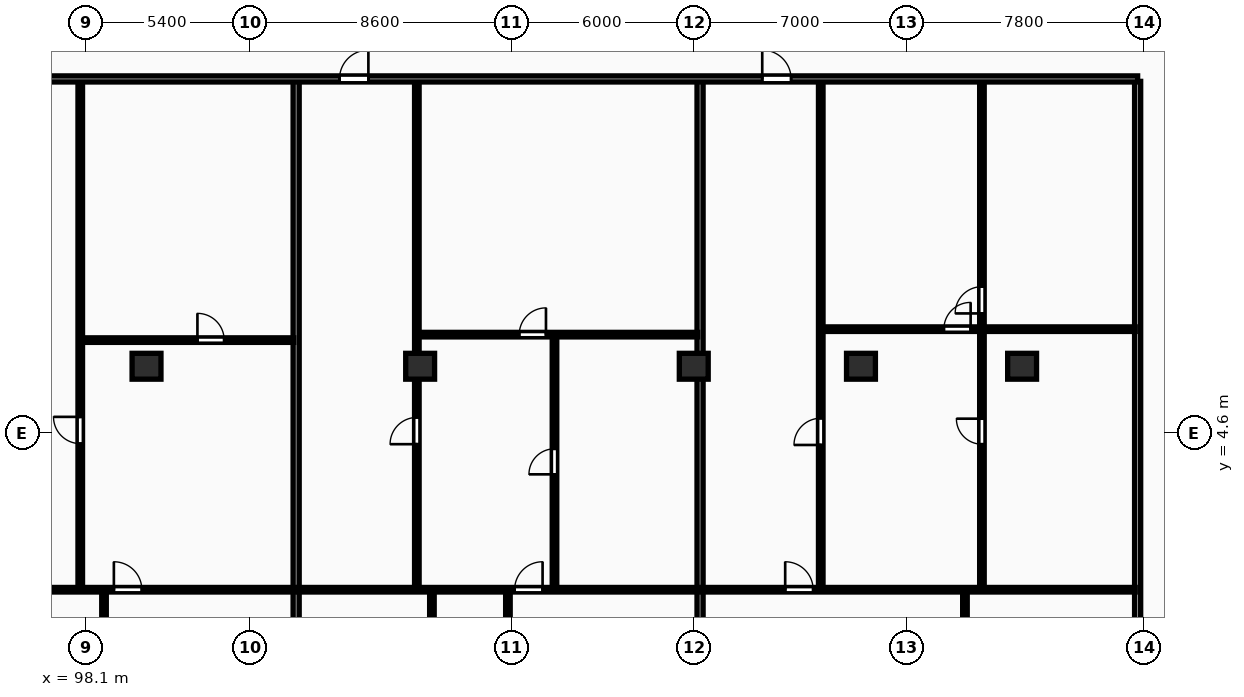
"""IFC4 building model, lengths in metres.
Left out: names, types, materials, properties, quantities, classifications, styles, units other than length and angle.
Written with IfcOpenShell. Run it as: python <this file> out.ifc"""

import sys

from ifc_helpers import new_model, si_unit, direction, frame, frame_2d, origin, origin_2d, place, context, subcontext, project, spatial, rectangle, extrude, element, fill, save


model = new_model("IFC4")
c1 = context("Model", 3, precision=1e-05, world=origin(), true_north=direction((0.0, 1.0)))
c2 = subcontext(c1, "Body", "Model", "MODEL_VIEW")
j1 = project(units=[si_unit("LENGTHUNIT", "METRE"), si_unit("PLANEANGLEUNIT", "RADIAN")], contexts=[c1])
p1 = place(None, origin())
s1 = spatial("IfcSite", under=j1, at=p1, CompositionType="ELEMENT")
p2 = place(p1, origin())
s2 = spatial("IfcBuilding", under=s1, at=p2, CompositionType="ELEMENT")
p3 = place(p2, frame((0.0, 0.0, 24.0)))
s3 = spatial("IfcBuildingStorey", under=s2, at=p3, CompositionType="ELEMENT", Elevation=24.0)
for number, where, z_axis, x_axis in (
    (1, (100.1, 6.8, 0.0), (0.0, 0.0, 1.0), (1.0, 0.0, 0.0)),
    (2, (109.1, 6.8, 0.0), (0.0, 0.0, 1.0), (1.0, 0.0, 0.0)),
    (3, (118.1, 6.8, 0.0), (0.0, 0.0, 1.0), (1.0, 0.0, 0.0)),
    (4, (123.6, 6.8, 0.0), (0.0, 0.0, 1.0), (1.0, 0.0, 0.0)),
    (5, (128.9, 6.8, 0.0), (0.0, 0.0, 1.0), (1.0, 0.0, 0.0)),
):
    element("IfcColumn", number, at=place(p3, frame(where, z_axis=z_axis, x_axis=x_axis)), inside=s3, PredefinedType="COLUMN", context=c2, shape_type="SweptSolid", body=[
        extrude(rectangle(XDim=0.95, YDim=0.85, at=origin_2d()), origin(), (0.0, 0.0, 1.0), 3.25),
    ])
for number, where, z_axis, x_axis in (
    (6, (132.7, -10.9, 0.0), (0.0, 0.0, 1.0), (0.0, 1.0, 0.0)),
    (7, (105.021, -10.9, 0.0), (0.0, 0.0, 1.0), (0.0, 1.0, 0.0)),
):
    element("IfcWall", number, at=place(p3, frame(where, z_axis=z_axis, x_axis=x_axis)), inside=s3, PredefinedType="PARTITIONING", context=c2, shape_type="SweptSolid", body=[
        extrude(rectangle(XDim=27.07, YDim=0.2, at=frame_2d((13.535, 0.0))), origin(), (0.0, 0.0, 1.0), 2.97),
    ])
p4 = place(p3, frame((97.98, 7.66, 0.0), z_axis=(0.0, 0.0, 1.0), x_axis=(1.0, 0.0, 0.0)))
e8 = element("IfcWall", 8, at=p4, inside=s3, PredefinedType="PARTITIONING", context=c2, shape_type="SweptSolid", body=[
    extrude(rectangle(XDim=6.961, YDim=0.15, at=frame_2d((3.481, 0.0))), origin(), (0.0, 0.0, 1.0), 2.97),
])
p5 = place(p4, frame((3.794, 0.0, 0.0)))
e9 = element("IfcOpeningElement", 9, at=p5, cuts=e8, PredefinedType="OPENING", context=c2, shape_type="SweptSolid", body=[
    extrude(rectangle(XDim=0.88, YDim=2.06, at=frame_2d((0.44, 1.03))), frame((0.0, 0.085, 0.0), z_axis=(0.0, -1.0, 0.0), x_axis=(1.0, 0.0, 0.0)), (0.0, 0.0, 1.0), 0.17),
])
p6 = place(p3, frame((97.92, -0.51, 0.0), z_axis=(0.0, 0.0, 1.0), x_axis=(0.0, 1.0, 0.0)))
e10 = element("IfcWall", 10, at=p6, inside=s3, PredefinedType="PARTITIONING", context=c2, shape_type="SweptSolid", body=[
    extrude(rectangle(XDim=16.7, YDim=0.15, at=frame_2d((8.35, 0.0))), origin(), (0.0, 0.0, 1.0), 2.97),
])
p7 = place(p6, frame((4.765, 0.0, 0.0)))
e11 = element("IfcOpeningElement", 11, at=p7, cuts=e10, PredefinedType="OPENING", context=c2, shape_type="SweptSolid", body=[
    extrude(rectangle(XDim=0.88, YDim=2.06, at=frame_2d((0.44, 1.03))), frame((0.0, 0.085, 0.0), z_axis=(0.0, -1.0, 0.0), x_axis=(1.0, 0.0, 0.0)), (0.0, 0.0, 1.0), 0.17),
])
p8 = place(p3, frame((98.701, -5.59, 0.0), z_axis=(0.0, 0.0, 1.0), x_axis=(0.0, 1.0, 0.0)))
e12 = element("IfcWall", 12, at=p8, inside=s3, PredefinedType="PARTITIONING", context=c2, shape_type="SweptSolid", body=[
    extrude(rectangle(XDim=5.0, YDim=0.15, at=frame_2d((2.5, 0.0))), origin(), (0.0, 0.0, 1.0), 2.97),
])
p9 = place(p8, frame((3.088, 0.0, 0.0)))
e13 = element("IfcOpeningElement", 13, at=p9, cuts=e12, PredefinedType="OPENING", context=c2, shape_type="SweptSolid", body=[
    extrude(rectangle(XDim=0.84, YDim=2.04, at=frame_2d((0.42, 1.02))), frame((0.0, 0.085, 0.0), z_axis=(0.0, -1.0, 0.0), x_axis=(1.0, 0.0, 0.0)), (0.0, 0.0, 1.0), 0.17),
])
p10 = place(p3, frame((94.03, -0.55, 0.0), z_axis=(0.0, 0.0, 1.0), x_axis=(1.0, 0.0, 0.0)))
e14 = element("IfcWall", 14, at=p10, inside=s3, PredefinedType="PARTITIONING", context=c2, shape_type="SweptSolid", body=[
    extrude(rectangle(XDim=10.911, YDim=0.15, at=frame_2d((5.456, 0.0))), origin(), (0.0, 0.0, 1.0), 2.97),
])
p11 = place(p10, frame((4.996, 0.0, 0.0)))
e15 = element("IfcOpeningElement", 15, at=p11, cuts=e14, PredefinedType="OPENING", context=c2, shape_type="SweptSolid", body=[
    extrude(rectangle(XDim=0.92, YDim=2.08, at=frame_2d((0.46, 1.04))), frame((0.0, 0.085, 0.0), z_axis=(0.0, -1.0, 0.0), x_axis=(1.0, 0.0, 0.0)), (0.0, 0.0, 1.0), 0.17),
])
p12 = place(p3, frame((118.307, -10.9, 0.0), z_axis=(0.0, 0.0, 1.0), x_axis=(0.0, 1.0, 0.0)))
e16 = element("IfcWall", 16, at=p12, inside=s3, PredefinedType="PARTITIONING", context=c2, shape_type="SweptSolid", body=[
    extrude(rectangle(XDim=27.07, YDim=0.2, at=frame_2d((13.535, 0.0))), origin(), (0.0, 0.0, 1.0), 2.22),
])
p13 = place(p3, frame((113.519, -0.51, 0.0), z_axis=(0.0, 0.0, 1.0), x_axis=(0.0, 1.0, 0.0)))
e17 = element("IfcWall", 17, at=p13, inside=s3, PredefinedType="PARTITIONING", context=c2, shape_type="SweptSolid", body=[
    extrude(rectangle(XDim=8.35, YDim=0.15, at=frame_2d((4.175, 0.0))), origin(), (0.0, 0.0, 1.0), 2.97),
])
p14 = place(p13, frame((3.755, 0.0, 0.0)))
e18 = element("IfcOpeningElement", 18, at=p14, cuts=e17, PredefinedType="OPENING", context=c2, shape_type="SweptSolid", body=[
    extrude(rectangle(XDim=0.84, YDim=2.04, at=frame_2d((0.42, 1.02))), frame((0.0, 0.085, 0.0), z_axis=(0.0, -1.0, 0.0), x_axis=(1.0, 0.0, 0.0)), (0.0, 0.0, 1.0), 0.17),
])
p15 = place(p3, frame((109.052, 7.84, 0.0), z_axis=(0.0, 0.0, 1.0), x_axis=(1.0, 0.0, 0.0)))
e19 = element("IfcWall", 19, at=p15, inside=s3, PredefinedType="PARTITIONING", context=c2, shape_type="SweptSolid", body=[
    extrude(rectangle(XDim=9.176, YDim=0.15, at=frame_2d((4.588, 0.0))), origin(), (0.0, 0.0, 1.0), 2.97),
])
p16 = place(p15, frame((3.307, 0.0, 0.0)))
e20 = element("IfcOpeningElement", 20, at=p16, cuts=e19, PredefinedType="OPENING", context=c2, shape_type="SweptSolid", body=[
    extrude(rectangle(XDim=0.88, YDim=2.06, at=frame_2d((0.44, 1.03))), frame((0.0, 0.085, 0.0), z_axis=(0.0, -1.0, 0.0), x_axis=(1.0, 0.0, 0.0)), (0.0, 0.0, 1.0), 0.17),
])
p17 = place(p3, frame((108.991, -0.51, 0.0), z_axis=(0.0, 0.0, 1.0), x_axis=(0.0, 1.0, 0.0)))
e21 = element("IfcWall", 21, at=p17, inside=s3, PredefinedType="PARTITIONING", context=c2, shape_type="SweptSolid", body=[
    extrude(rectangle(XDim=16.7, YDim=0.15, at=frame_2d((8.35, 0.0))), origin(), (0.0, 0.0, 1.0), 2.22),
])
p18 = place(p17, frame((4.747, 0.0, 0.0)))
e22 = element("IfcOpeningElement", 22, at=p18, cuts=e21, PredefinedType="OPENING", context=c2, shape_type="SweptSolid", body=[
    extrude(rectangle(XDim=0.88, YDim=2.06, at=frame_2d((0.44, 1.03))), frame((0.0, 0.085, 0.0), z_axis=(0.0, -1.0, 0.0), x_axis=(1.0, 0.0, 0.0)), (0.0, 0.0, 1.0), 0.17),
])
p19 = place(p3, frame((109.487, -5.59, 0.0), z_axis=(0.0, 0.0, 1.0), x_axis=(0.0, 1.0, 0.0)))
e23 = element("IfcWall", 23, at=p19, inside=s3, PredefinedType="PARTITIONING", context=c2, shape_type="SweptSolid", body=[
    extrude(rectangle(XDim=5.0, YDim=0.15, at=frame_2d((2.5, 0.0))), origin(), (0.0, 0.0, 1.0), 2.22),
])
p20 = place(p19, frame((3.049, 0.0, 0.0)))
e24 = element("IfcOpeningElement", 24, at=p20, cuts=e23, PredefinedType="OPENING", context=c2, shape_type="SweptSolid", body=[
    extrude(rectangle(XDim=0.84, YDim=2.04, at=frame_2d((0.42, 1.02))), frame((0.0, 0.085, 0.0), z_axis=(0.0, -1.0, 0.0), x_axis=(1.0, 0.0, 0.0)), (0.0, 0.0, 1.0), 0.17),
])
p21 = place(p3, frame((111.987, -5.59, 0.0), z_axis=(0.0, 0.0, 1.0), x_axis=(0.0, 1.0, 0.0)))
e25 = element("IfcWall", 25, at=p21, inside=s3, PredefinedType="PARTITIONING", context=c2, shape_type="SweptSolid", body=[
    extrude(rectangle(XDim=5.0, YDim=0.15, at=frame_2d((2.5, 0.0))), origin(), (0.0, 0.0, 1.0), 2.97),
])
p22 = place(p21, frame((2.08, 0.0, 0.0)))
e26 = element("IfcOpeningElement", 26, at=p22, cuts=e25, PredefinedType="OPENING", context=c2, shape_type="SweptSolid", body=[
    extrude(rectangle(XDim=0.84, YDim=2.04, at=frame_2d((0.42, 1.02))), frame((0.0, 0.085, 0.0), z_axis=(0.0, -1.0, 0.0), x_axis=(1.0, 0.0, 0.0)), (0.0, 0.0, 1.0), 0.17),
])
p23 = place(p3, frame((105.101, -0.55, 0.0), z_axis=(0.0, 0.0, 1.0), x_axis=(1.0, 0.0, 0.0)))
e27 = element("IfcWall", 27, at=p23, inside=s3, PredefinedType="PARTITIONING", context=c2, shape_type="SweptSolid", body=[
    extrude(rectangle(XDim=13.126, YDim=0.15, at=frame_2d((6.563, 0.0))), origin(), (0.0, 0.0, 1.0), 2.97),
])
p24 = place(p23, frame((7.106, 0.0, 0.0)))
e28 = element("IfcOpeningElement", 28, at=p24, cuts=e27, PredefinedType="OPENING", context=c2, shape_type="SweptSolid", body=[
    extrude(rectangle(XDim=0.92, YDim=2.08, at=frame_2d((0.46, 1.04))), frame((0.0, 0.085, 0.0), z_axis=(0.0, -1.0, 0.0), x_axis=(1.0, 0.0, 0.0)), (0.0, 0.0, 1.0), 0.17),
])
p25 = place(p3, frame((127.579, -0.51, 0.0), z_axis=(0.0, 0.0, 1.0), x_axis=(0.0, 1.0, 0.0)))
e29 = element("IfcWall", 29, at=p25, inside=s3, PredefinedType="PARTITIONING", context=c2, shape_type="SweptSolid", body=[
    extrude(rectangle(XDim=16.7, YDim=0.15, at=frame_2d((8.35, 0.0))), origin(), (0.0, 0.0, 1.0), 2.97),
])
p26 = place(p25, frame((4.746, 0.0, 0.0)))
e30 = element("IfcOpeningElement", 30, at=p26, cuts=e29, PredefinedType="OPENING", context=c2, shape_type="SweptSolid", body=[
    extrude(rectangle(XDim=0.84, YDim=2.04, at=frame_2d((0.42, 1.02))), frame((0.0, 0.085, 0.0), z_axis=(0.0, -1.0, 0.0), x_axis=(1.0, 0.0, 0.0)), (0.0, 0.0, 1.0), 0.17),
])
p27 = place(p25, frame((9.048, 0.0, 0.0)))
e31 = element("IfcOpeningElement", 31, at=p27, cuts=e29, PredefinedType="OPENING", context=c2, shape_type="SweptSolid", body=[
    extrude(rectangle(XDim=0.88, YDim=2.06, at=frame_2d((0.44, 1.03))), frame((0.0, 0.085, 0.0), z_axis=(0.0, -1.0, 0.0), x_axis=(1.0, 0.0, 0.0)), (0.0, 0.0, 1.0), 0.17),
])
p28 = place(p3, frame((122.337, 8.02, 0.0), z_axis=(0.0, 0.0, 1.0), x_axis=(1.0, 0.0, 0.0)))
e32 = element("IfcWall", 32, at=p28, inside=s3, PredefinedType="PARTITIONING", context=c2, shape_type="SweptSolid", body=[
    extrude(rectangle(XDim=10.283, YDim=0.15, at=frame_2d((5.142, 0.0))), origin(), (0.0, 0.0, 1.0), 2.97),
])
p29 = place(p28, frame((3.99, 0.0, 0.0)))
e33 = element("IfcOpeningElement", 33, at=p29, cuts=e32, PredefinedType="OPENING", context=c2, shape_type="SweptSolid", body=[
    extrude(rectangle(XDim=0.88, YDim=2.06, at=frame_2d((0.44, 1.03))), frame((0.0, 0.085, 0.0), z_axis=(0.0, -1.0, 0.0), x_axis=(1.0, 0.0, 0.0)), (0.0, 0.0, 1.0), 0.17),
])
p30 = place(p3, frame((122.277, -0.51, 0.0), z_axis=(0.0, 0.0, 1.0), x_axis=(0.0, 1.0, 0.0)))
e34 = element("IfcWall", 34, at=p30, inside=s3, PredefinedType="PARTITIONING", context=c2, shape_type="SweptSolid", body=[
    extrude(rectangle(XDim=16.7, YDim=0.15, at=frame_2d((8.35, 0.0))), origin(), (0.0, 0.0, 1.0), 2.97),
])
p31 = place(p30, frame((4.721, 0.0, 0.0)))
e35 = element("IfcOpeningElement", 35, at=p31, cuts=e34, PredefinedType="OPENING", context=c2, shape_type="SweptSolid", body=[
    extrude(rectangle(XDim=0.88, YDim=2.06, at=frame_2d((0.44, 1.03))), frame((0.0, 0.085, 0.0), z_axis=(0.0, -1.0, 0.0), x_axis=(1.0, 0.0, 0.0)), (0.0, 0.0, 1.0), 0.17),
])
p32 = place(p3, frame((127.02, -10.9, 0.0), z_axis=(0.0, 0.0, 1.0), x_axis=(0.0, 1.0, 0.0)))
e36 = element("IfcWall", 36, at=p32, inside=s3, PredefinedType="PARTITIONING", context=c2, shape_type="SweptSolid", body=[
    extrude(rectangle(XDim=10.31, YDim=0.15, at=frame_2d((5.155, 0.0))), origin(), (0.0, 0.0, 1.0), 2.97),
])
p33 = place(p32, frame((5.55, 0.0, 0.0)))
e37 = element("IfcOpeningElement", 37, at=p33, cuts=e36, PredefinedType="OPENING", context=c2, shape_type="SweptSolid", body=[
    extrude(rectangle(XDim=0.84, YDim=2.04, at=frame_2d((0.42, 1.02))), frame((0.0, 0.085, 0.0), z_axis=(0.0, -1.0, 0.0), x_axis=(1.0, 0.0, 0.0)), (0.0, 0.0, 1.0), 0.17),
])
p34 = place(p32, frame((8.362, 0.0, 0.0)))
e38 = element("IfcOpeningElement", 38, at=p34, cuts=e36, PredefinedType="OPENING", context=c2, shape_type="SweptSolid", body=[
    extrude(rectangle(XDim=0.84, YDim=2.04, at=frame_2d((0.42, 1.02))), frame((0.0, 0.085, 0.0), z_axis=(0.0, -1.0, 0.0), x_axis=(1.0, 0.0, 0.0)), (0.0, 0.0, 1.0), 0.17),
])
p35 = place(p32, frame((3.95, 0.0, 0.0)))
e39 = element("IfcOpeningElement", 39, at=p35, cuts=e36, PredefinedType="OPENING", context=c2, shape_type="SweptSolid", body=[
    extrude(rectangle(XDim=0.88, YDim=2.06, at=frame_2d((0.44, 1.03))), frame((0.0, 0.085, 0.0), z_axis=(0.0, -1.0, 0.0), x_axis=(1.0, 0.0, 0.0)), (0.0, 0.0, 1.0), 0.17),
])
p36 = place(p3, frame((118.387, -0.55, 0.0), z_axis=(0.0, 0.0, 1.0), x_axis=(1.0, 0.0, 0.0)))
e40 = element("IfcWall", 40, at=p36, inside=s3, PredefinedType="PARTITIONING", context=c2, shape_type="SweptSolid", body=[
    extrude(rectangle(XDim=14.233, YDim=0.15, at=frame_2d((7.116, 0.0))), origin(), (0.0, 0.0, 1.0), 2.97),
])
p37 = place(p36, frame((2.72, 0.0, 0.0)))
e41 = element("IfcOpeningElement", 41, at=p37, cuts=e40, PredefinedType="OPENING", context=c2, shape_type="SweptSolid", body=[
    extrude(rectangle(XDim=0.92, YDim=2.08, at=frame_2d((0.46, 1.04))), frame((0.0, 0.085, 0.0), z_axis=(0.0, -1.0, 0.0), x_axis=(1.0, 0.0, 0.0)), (0.0, 0.0, 1.0), 0.17),
])
p38 = place(p3, frame((70.7, 16.25, 0.0), z_axis=(0.0, 0.0, 1.0), x_axis=(1.0, 0.0, 0.0)))
e42 = element("IfcWall", 42, at=p38, inside=s3, PredefinedType="PARTITIONING", context=c2, shape_type="SweptSolid", body=[
    extrude(rectangle(XDim=62.0, YDim=0.2, at=frame_2d((31.0, 0.0))), origin(), (0.0, 0.0, 1.0), 2.97),
])
p39 = place(p38, frame((1.186, 0.0, 0.0)))
e43 = element("IfcOpeningElement", 43, at=p39, cuts=e42, PredefinedType="OPENING", context=c2, shape_type="SweptSolid", body=[
    extrude(rectangle(XDim=0.95, YDim=2.15, at=frame_2d((0.475, 1.075))), frame((0.0, 0.11, 0.0), z_axis=(0.0, -1.0, 0.0), x_axis=(1.0, 0.0, 0.0)), (0.0, 0.0, 1.0), 0.22),
])
p40 = place(p38, frame((13.116, 0.0, 0.0)))
e44 = element("IfcOpeningElement", 44, at=p40, cuts=e42, PredefinedType="OPENING", context=c2, shape_type="SweptSolid", body=[
    extrude(rectangle(XDim=0.95, YDim=2.15, at=frame_2d((0.475, 1.075))), frame((0.0, 0.11, 0.0), z_axis=(0.0, -1.0, 0.0), x_axis=(1.0, 0.0, 0.0)), (0.0, 0.0, 1.0), 0.22),
])
p41 = place(p38, frame((25.295, 0.0, 0.0)))
e45 = element("IfcOpeningElement", 45, at=p41, cuts=e42, PredefinedType="OPENING", context=c2, shape_type="SweptSolid", body=[
    extrude(rectangle(XDim=0.95, YDim=2.15, at=frame_2d((0.475, 1.075))), frame((0.0, 0.11, 0.0), z_axis=(0.0, -1.0, 0.0), x_axis=(1.0, 0.0, 0.0)), (0.0, 0.0, 1.0), 0.22),
])
p42 = place(p38, frame((35.747, 0.0, 0.0)))
e46 = element("IfcOpeningElement", 46, at=p42, cuts=e42, PredefinedType="OPENING", context=c2, shape_type="SweptSolid", body=[
    extrude(rectangle(XDim=0.95, YDim=2.15, at=frame_2d((0.475, 1.075))), frame((0.0, 0.11, 0.0), z_axis=(0.0, -1.0, 0.0), x_axis=(1.0, 0.0, 0.0)), (0.0, 0.0, 1.0), 0.22),
])
p43 = place(p38, frame((49.652, 0.0, 0.0)))
e47 = element("IfcOpeningElement", 47, at=p43, cuts=e42, PredefinedType="OPENING", context=c2, shape_type="SweptSolid", body=[
    extrude(rectangle(XDim=0.95, YDim=2.15, at=frame_2d((0.475, 1.075))), frame((0.0, 0.11, 0.0), z_axis=(0.0, -1.0, 0.0), x_axis=(1.0, 0.0, 0.0)), (0.0, 0.0, 1.0), 0.22),
])
p44 = place(p5, origin())
e48 = element("IfcDoor", 48, at=p44, inside=s3, OperationType="SINGLE_SWING_LEFT", PredefinedType="DOOR", context=c2, shape_type="SweptSolid", body=[
    extrude(rectangle(XDim=0.88, YDim=2.06, at=frame_2d((0.44, 1.03))), frame((0.0, 0.025, 0.0), z_axis=(0.0, -1.0, 0.0), x_axis=(1.0, 0.0, 0.0)), (0.0, 0.0, 1.0), 0.05),
])
fill(e9, e48)
p45 = place(p7, origin())
e49 = element("IfcDoor", 49, at=p45, inside=s3, OperationType="SINGLE_SWING_RIGHT", PredefinedType="DOOR", context=c2, shape_type="SweptSolid", body=[
    extrude(rectangle(XDim=0.88, YDim=2.06, at=frame_2d((0.44, 1.03))), frame((0.0, 0.025, 0.0), z_axis=(0.0, -1.0, 0.0), x_axis=(1.0, 0.0, 0.0)), (0.0, 0.0, 1.0), 0.05),
])
fill(e11, e49)
p46 = place(p11, origin())
e50 = element("IfcDoor", 50, at=p46, inside=s3, OperationType="SINGLE_SWING_LEFT", PredefinedType="DOOR", context=c2, shape_type="SweptSolid", body=[
    extrude(rectangle(XDim=0.92, YDim=2.08, at=frame_2d((0.46, 1.04))), frame((0.0, 0.025, 0.0), z_axis=(0.0, -1.0, 0.0), x_axis=(1.0, 0.0, 0.0)), (0.0, 0.0, 1.0), 0.05),
])
fill(e15, e50)
p47 = place(p14, origin())
e51 = element("IfcDoor", 51, at=p47, inside=s3, OperationType="SINGLE_SWING_LEFT", PredefinedType="DOOR", context=c2, shape_type="SweptSolid", body=[
    extrude(rectangle(XDim=0.84, YDim=2.04, at=frame_2d((0.42, 1.02))), frame((0.0, 0.025, 0.0), z_axis=(0.0, -1.0, 0.0), x_axis=(1.0, 0.0, 0.0)), (0.0, 0.0, 1.0), 0.05),
])
fill(e18, e51)
p48 = place(p16, origin())
e52 = element("IfcDoor", 52, at=p48, inside=s3, OperationType="SINGLE_SWING_RIGHT", PredefinedType="DOOR", context=c2, shape_type="SweptSolid", body=[
    extrude(rectangle(XDim=0.88, YDim=2.06, at=frame_2d((0.44, 1.03))), frame((0.0, 0.025, 0.0), z_axis=(0.0, -1.0, 0.0), x_axis=(1.0, 0.0, 0.0)), (0.0, 0.0, 1.0), 0.05),
])
fill(e20, e52)
p49 = place(p18, origin())
e53 = element("IfcDoor", 53, at=p49, inside=s3, OperationType="SINGLE_SWING_LEFT", PredefinedType="DOOR", context=c2, shape_type="SweptSolid", body=[
    extrude(rectangle(XDim=0.88, YDim=2.06, at=frame_2d((0.44, 1.03))), frame((0.0, 0.025, 0.0), z_axis=(0.0, -1.0, 0.0), x_axis=(1.0, 0.0, 0.0)), (0.0, 0.0, 1.0), 0.05),
])
fill(e22, e53)
p50 = place(p24, origin())
e54 = element("IfcDoor", 54, at=p50, inside=s3, OperationType="SINGLE_SWING_RIGHT", PredefinedType="DOOR", context=c2, shape_type="SweptSolid", body=[
    extrude(rectangle(XDim=0.92, YDim=2.08, at=frame_2d((0.46, 1.04))), frame((0.0, 0.025, 0.0), z_axis=(0.0, -1.0, 0.0), x_axis=(1.0, 0.0, 0.0)), (0.0, 0.0, 1.0), 0.05),
])
fill(e28, e54)
p51 = place(p26, origin())
e55 = element("IfcDoor", 55, at=p51, inside=s3, OperationType="SINGLE_SWING_RIGHT", PredefinedType="DOOR", context=c2, shape_type="SweptSolid", body=[
    extrude(rectangle(XDim=0.84, YDim=2.04, at=frame_2d((0.42, 1.02))), frame((0.0, 0.025, 0.0), z_axis=(0.0, -1.0, 0.0), x_axis=(1.0, 0.0, 0.0)), (0.0, 0.0, 1.0), 0.05),
])
fill(e30, e55)
p52 = place(p27, origin())
e56 = element("IfcDoor", 56, at=p52, inside=s3, OperationType="SINGLE_SWING_LEFT", PredefinedType="DOOR", context=c2, shape_type="SweptSolid", body=[
    extrude(rectangle(XDim=0.88, YDim=2.06, at=frame_2d((0.44, 1.03))), frame((0.0, 0.025, 0.0), z_axis=(0.0, -1.0, 0.0), x_axis=(1.0, 0.0, 0.0)), (0.0, 0.0, 1.0), 0.05),
])
fill(e31, e56)
p53 = place(p29, origin())
e57 = element("IfcDoor", 57, at=p53, inside=s3, OperationType="SINGLE_SWING_RIGHT", PredefinedType="DOOR", context=c2, shape_type="SweptSolid", body=[
    extrude(rectangle(XDim=0.88, YDim=2.06, at=frame_2d((0.44, 1.03))), frame((0.0, 0.025, 0.0), z_axis=(0.0, -1.0, 0.0), x_axis=(1.0, 0.0, 0.0)), (0.0, 0.0, 1.0), 0.05),
])
fill(e33, e57)
p54 = place(p31, origin())
e58 = element("IfcDoor", 58, at=p54, inside=s3, OperationType="SINGLE_SWING_LEFT", PredefinedType="DOOR", context=c2, shape_type="SweptSolid", body=[
    extrude(rectangle(XDim=0.88, YDim=2.06, at=frame_2d((0.44, 1.03))), frame((0.0, 0.025, 0.0), z_axis=(0.0, -1.0, 0.0), x_axis=(1.0, 0.0, 0.0)), (0.0, 0.0, 1.0), 0.05),
])
fill(e35, e58)
p55 = place(p37, origin())
e59 = element("IfcDoor", 59, at=p55, inside=s3, OperationType="SINGLE_SWING_LEFT", PredefinedType="DOOR", context=c2, shape_type="SweptSolid", body=[
    extrude(rectangle(XDim=0.92, YDim=2.08, at=frame_2d((0.46, 1.04))), frame((0.0, 0.025, 0.0), z_axis=(0.0, -1.0, 0.0), x_axis=(1.0, 0.0, 0.0)), (0.0, 0.0, 1.0), 0.05),
])
fill(e41, e59)
p56 = place(p42, origin())
e60 = element("IfcDoor", 60, at=p56, inside=s3, OperationType="SINGLE_SWING_RIGHT", PredefinedType="DOOR", context=c2, shape_type="SweptSolid", body=[
    extrude(rectangle(XDim=0.95, YDim=2.15, at=frame_2d((0.475, 1.075))), frame((0.0, 0.025, 0.0), z_axis=(0.0, -1.0, 0.0), x_axis=(1.0, 0.0, 0.0)), (0.0, 0.0, 1.0), 0.05),
])
fill(e46, e60)
p57 = place(p43, origin())
e61 = element("IfcDoor", 61, at=p57, inside=s3, OperationType="SINGLE_SWING_LEFT", PredefinedType="DOOR", context=c2, shape_type="SweptSolid", body=[
    extrude(rectangle(XDim=0.95, YDim=2.15, at=frame_2d((0.475, 1.075))), frame((0.0, 0.025, 0.0), z_axis=(0.0, -1.0, 0.0), x_axis=(1.0, 0.0, 0.0)), (0.0, 0.0, 1.0), 0.05),
])
fill(e47, e61)
save(model, sys.argv[1])
